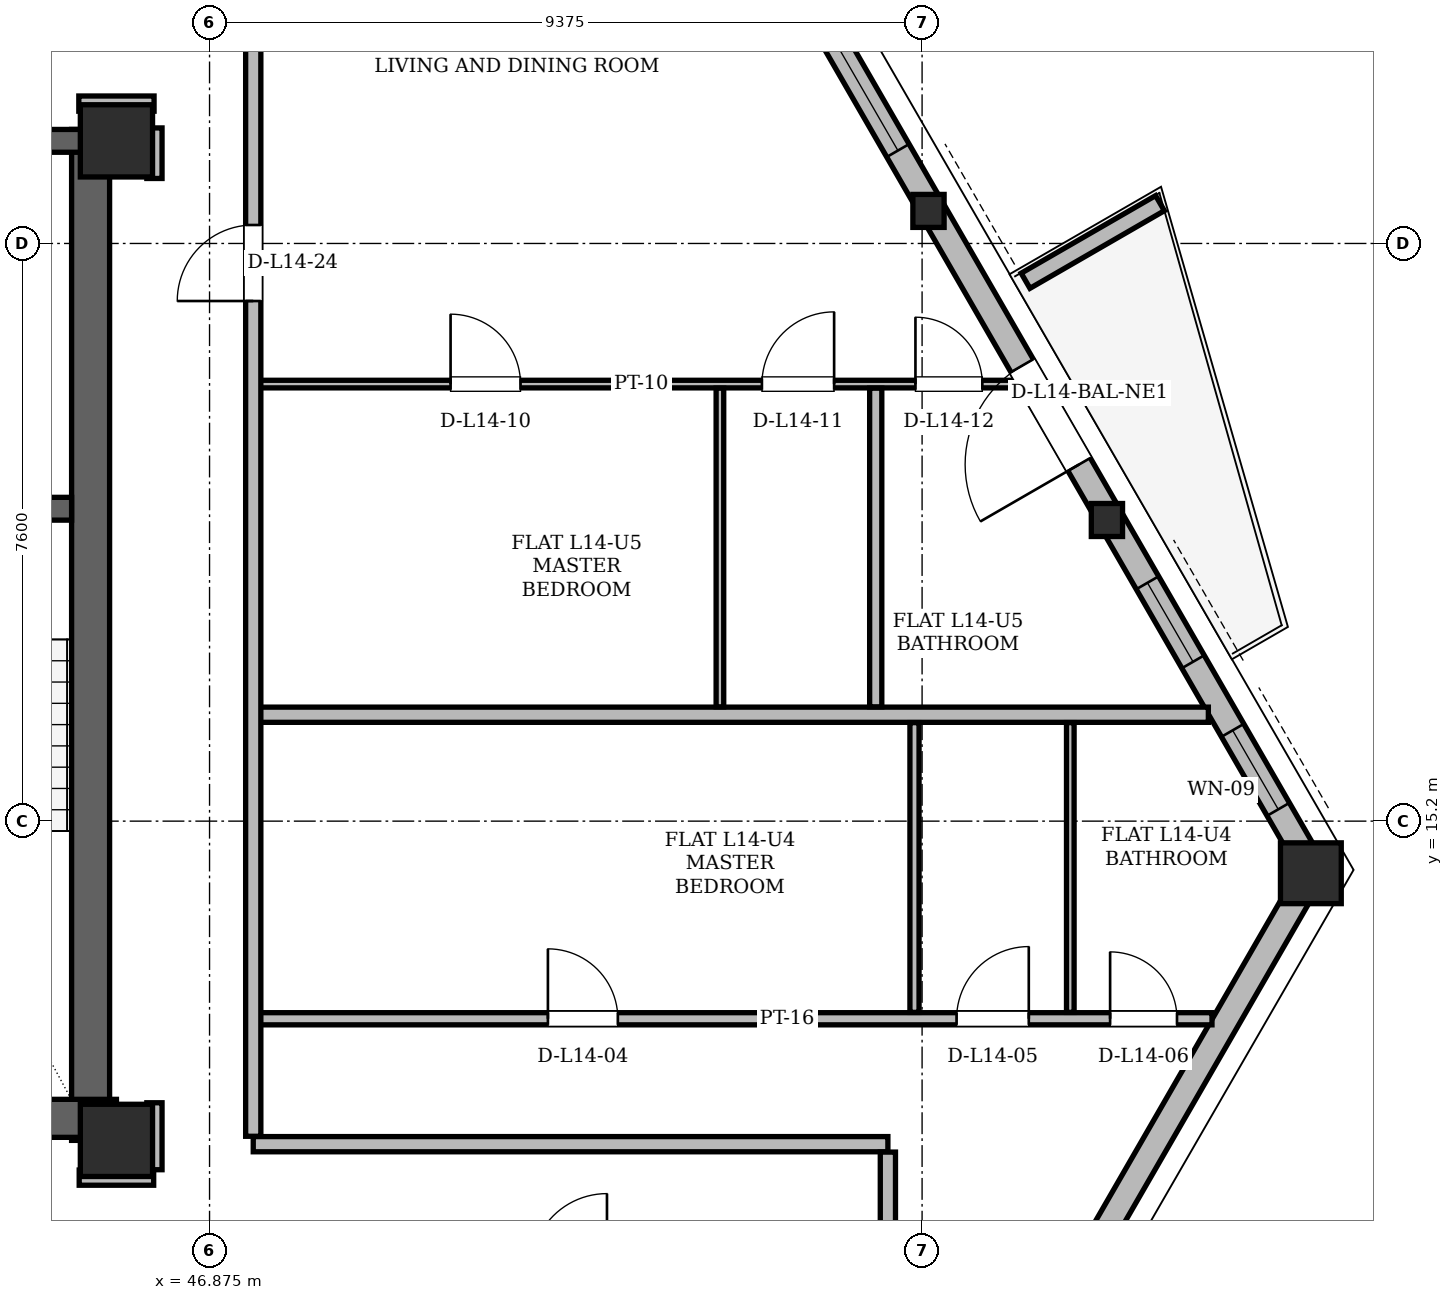
"""IFC4 building model, lengths in metres.
Left out: names, types, materials, properties, quantities, classifications, styles, units other than length and angle.
Written with IfcOpenShell. Run it as: python <this file> out.ifc"""

import sys

from ifc_helpers import new_model, si_unit, direction, frame, frame_2d, origin, origin_2d, place, context, subcontext, project, spatial, polyline, rectangle, hollow_rectangle, i_section, outline, extrude, element, fill, save


model = new_model("IFC4")
c1 = context("Model", 3, precision=1e-05, world=origin(), true_north=direction((0.0, 1.0)))
c2 = subcontext(c1, "Body", "Model", "MODEL_VIEW")
j1 = project(units=[si_unit("LENGTHUNIT", "METRE"), si_unit("PLANEANGLEUNIT", "RADIAN")], contexts=[c1])
p1 = place(None, origin())
s1 = spatial("IfcSite", under=j1, at=p1, CompositionType="ELEMENT")
p2 = place(p1, origin())
s2 = spatial("IfcBuilding", under=s1, at=p2, CompositionType="ELEMENT")
p3 = place(p2, frame((0.0, 0.0, 56.1)))
s3 = spatial("IfcBuildingStorey", under=s2, at=p3, CompositionType="ELEMENT", Elevation=56.1)
for number, where, z_axis, x_axis in (
    (1, (45.65, 11.0, 0.0), (0.0, 0.0, 1.0), (1.0, 0.0, 0.0)),
    (2, (45.65, 24.15, 0.0), (0.0, 0.0, 1.0), (1.0, 0.0, 0.0)),
):
    element("IfcColumn", number, at=place(p3, frame(where, z_axis=z_axis, x_axis=x_axis)), inside=s3, PredefinedType="COLUMN", context=c2, shape_type="SweptSolid", body=[
        extrude(hollow_rectangle(XDim=0.95, YDim=0.95, WallThickness=0.08, at=origin_2d()), origin(), (0.0, 0.0, 1.0), 3.6),
    ])
p4 = place(p3, frame((61.396, 14.559, 0.004), z_axis=(-0.017192634037, -0.024531782164, 0.999551201789), x_axis=(0.818912078135, -0.573918991047, 0.0)))
e3 = element("IfcColumn", 3, at=p4, inside=s3, PredefinedType="COLUMN", context=c2, shape_type="SweptSolid", body=[
    extrude(hollow_rectangle(XDim=0.8, YDim=0.8, WallThickness=0.065, at=origin_2d()), origin(), (0.0, 0.0, 1.0), 3.593),
])
for number, where, z_axis, x_axis in (
    (4, (58.716, 19.2, 0.004), (-0.019, -0.021, 1.0), (0.74, -0.673, 0.0)),
    (5, (56.372, 23.26, 0.004), (-0.021, -0.018, 1.0), (0.65, -0.76, 0.0)),
):
    element("IfcColumn", number, at=place(p3, frame(where, z_axis=z_axis, x_axis=x_axis)), inside=s3, PredefinedType="COLUMN", context=c2, shape_type="SweptSolid", body=[
        extrude(i_section(OverallWidth=0.411, OverallDepth=0.434, WebThickness=0.036, FlangeThickness=0.057, at=origin_2d()), origin(), (0.0, 0.0, 1.0), 3.593),
    ])
p5 = place(p3, frame((45.31, 11.0, 0.0), z_axis=(0.0, 0.0, 1.0), x_axis=(0.0, 1.0, 0.0)))
e6 = element("IfcWall", 6, at=p5, inside=s3, PredefinedType="SHEAR", context=c2, shape_type="SweptSolid", body=[
    extrude(rectangle(XDim=13.3, YDim=0.5, at=frame_2d((6.65, 0.0))), origin(), (0.0, 0.0, 1.0), 3.36),
])
p6 = place(p3, frame((38.55, 11.29, 0.0), z_axis=(0.0, 0.0, 1.0), x_axis=(1.0, 0.0, 0.0)))
e7 = element("IfcWall", 7, at=p6, inside=s3, PredefinedType="SHEAR", context=c2, shape_type="SweptSolid", body=[
    extrude(rectangle(XDim=7.1, YDim=0.5, at=frame_2d((3.55, 0.0))), origin(), (0.0, 0.0, 1.0), 3.36),
])
p7 = place(p3, frame((29.65, 24.15, 0.0), z_axis=(0.0, 0.0, 1.0), x_axis=(1.0, 0.0, 0.0)))
e8 = element("IfcWall", 8, at=p7, inside=s3, PredefinedType="SHEAR", context=c2, shape_type="SweptSolid", body=[
    extrude(rectangle(XDim=15.7, YDim=0.3, at=frame_2d((7.85, 0.0))), origin(), (0.0, 0.0, 1.0), 3.36),
])
p8 = place(p7, frame((1.7, 0.0, 0.0)))
e9 = element("IfcOpeningElement", 9, at=p8, cuts=e8, PredefinedType="OPENING", context=c2, shape_type="SweptSolid", body=[
    extrude(rectangle(XDim=1.2, YDim=2.2, at=frame_2d((0.6, 1.1))), frame((0.0, 0.15, 0.0), z_axis=(0.0, -1.0, 0.0), x_axis=(1.0, 0.0, 0.0)), (0.0, 0.0, 1.0), 0.3),
])
p9 = place(p7, frame((12.8, 0.0, 0.0)))
e10 = element("IfcOpeningElement", 10, at=p9, cuts=e8, PredefinedType="OPENING", context=c2, shape_type="SweptSolid", body=[
    extrude(rectangle(XDim=1.2, YDim=2.2, at=frame_2d((0.6, 1.1))), frame((0.0, 0.15, 0.0), z_axis=(0.0, -1.0, 0.0), x_axis=(1.0, 0.0, 0.0)), (0.0, 0.0, 1.0), 0.3),
])
p10 = place(p7, frame((6.55, 0.0, 0.0)))
e11 = element("IfcOpeningElement", 11, at=p10, cuts=e8, PredefinedType="OPENING", context=c2, shape_type="SweptSolid", body=[
    extrude(rectangle(XDim=0.9, YDim=2.05, at=frame_2d((0.45, 1.025))), frame((0.0, 0.15, 0.0), z_axis=(0.0, -1.0, 0.0), x_axis=(1.0, 0.0, 0.0)), (0.0, 0.0, 1.0), 0.3),
])
p11 = place(p7, frame((8.45, 0.0, 0.0)))
e12 = element("IfcOpeningElement", 12, at=p11, cuts=e8, PredefinedType="OPENING", context=c2, shape_type="SweptSolid", body=[
    extrude(rectangle(XDim=0.9, YDim=2.05, at=frame_2d((0.45, 1.025))), frame((0.0, 0.15, 0.0), z_axis=(0.0, -1.0, 0.0), x_axis=(1.0, 0.0, 0.0)), (0.0, 0.0, 1.0), 0.3),
])
p12 = place(p3, frame((41.05, 19.31, 0.0), z_axis=(0.0, 0.0, 1.0), x_axis=(1.0, 0.0, 0.0)))
e13 = element("IfcWall", 13, at=p12, inside=s3, PredefinedType="SHEAR", context=c2, shape_type="SweptSolid", body=[
    extrude(rectangle(XDim=4.01, YDim=0.3, at=frame_2d((2.005, 0.0))), origin(), (0.0, 0.0, 1.0), 3.36),
])
p13 = place(p12, frame((1.6, 0.0, 0.0)))
e14 = element("IfcOpeningElement", 14, at=p13, cuts=e13, PredefinedType="OPENING", context=c2, shape_type="SweptSolid", body=[
    extrude(rectangle(XDim=1.4, YDim=2.2, at=frame_2d((0.7, 1.1))), frame((0.0, 0.15, 0.0), z_axis=(0.0, -1.0, 0.0), x_axis=(1.0, 0.0, 0.0)), (0.0, 0.0, 1.0), 0.3),
])
p14 = place(p3, frame((54.247, 2.176, 0.0), z_axis=(0.0, 0.0, 1.0), x_axis=(0.500012153807, 0.866018386667, 0.0)))
e15 = element("IfcWall", 15, at=p14, inside=s3, PredefinedType="SOLIDWALL", context=c2, shape_type="SweptSolid", body=[
    extrude(rectangle(XDim=14.298, YDim=0.34, at=frame_2d((7.149, 0.0))), origin(), (0.0, 0.0, 1.0), 2.494),
])
p15 = place(p3, frame((61.396, 14.559, 0.0), z_axis=(0.0, 0.0, 1.0), x_axis=(-0.500002389912, 0.866024023964, 0.0)))
e16 = element("IfcWall", 16, at=p15, inside=s3, PredefinedType="SOLIDWALL", context=c2, shape_type="SweptSolid", body=[
    extrude(rectangle(XDim=33.494, YDim=0.34, at=frame_2d((16.747, 0.0))), origin(), (0.0, 0.0, 1.0), 2.494),
])
p16 = place(p15, frame((6.159, 0.0, 0.0)))
e17 = element("IfcOpeningElement", 17, at=p16, cuts=e16, PredefinedType="OPENING", context=c2, shape_type="SweptSolid", body=[
    extrude(rectangle(XDim=1.5, YDim=2.2, at=frame_2d((0.75, 1.1))), frame((0.0, 0.17, 0.0), z_axis=(0.0, -1.0, 0.0), x_axis=(1.0, 0.0, 0.0)), (0.0, 0.0, 1.0), 0.34),
])
p17 = place(p15, frame((24.379, 0.0, 0.0)))
e18 = element("IfcOpeningElement", 18, at=p17, cuts=e16, PredefinedType="OPENING", context=c2, shape_type="SweptSolid", body=[
    extrude(rectangle(XDim=1.5, YDim=2.2, at=frame_2d((0.75, 1.1))), frame((0.0, 0.17, 0.0), z_axis=(0.0, -1.0, 0.0), x_axis=(1.0, 0.0, 0.0)), (0.0, 0.0, 1.0), 0.34),
])
p18 = place(p15, frame((0.92, 0.0, 0.85)))
e19 = element("IfcOpeningElement", 19, at=p18, cuts=e16, PredefinedType="OPENING", context=c2, shape_type="SweptSolid", body=[
    extrude(rectangle(XDim=1.2, YDim=1.48, at=frame_2d((0.6, 0.74))), frame((0.0, 0.17, 0.0), z_axis=(0.0, -1.0, 0.0), x_axis=(1.0, 0.0, 0.0)), (0.0, 0.0, 1.0), 0.34),
])
p19 = place(p15, frame((10.928, 0.0, 0.85)))
e20 = element("IfcOpeningElement", 20, at=p19, cuts=e16, PredefinedType="OPENING", context=c2, shape_type="SweptSolid", body=[
    extrude(rectangle(XDim=1.6, YDim=1.534, at=frame_2d((0.8, 0.767))), frame((0.0, 0.17, 0.0), z_axis=(0.0, -1.0, 0.0), x_axis=(1.0, 0.0, 0.0)), (0.0, 0.0, 1.0), 0.34),
])
p20 = place(p15, frame((18.529, 0.0, 0.85)))
e21 = element("IfcOpeningElement", 21, at=p20, cuts=e16, PredefinedType="OPENING", context=c2, shape_type="SweptSolid", body=[
    extrude(rectangle(XDim=3.0, YDim=1.534, at=frame_2d((1.5, 0.767))), frame((0.0, 0.17, 0.0), z_axis=(0.0, -1.0, 0.0), x_axis=(1.0, 0.0, 0.0)), (0.0, 0.0, 1.0), 0.34),
])
p21 = place(p15, frame((3.162, 0.0, 0.85)))
e22 = element("IfcOpeningElement", 22, at=p21, cuts=e16, PredefinedType="OPENING", context=c2, shape_type="SweptSolid", body=[
    extrude(rectangle(XDim=1.2, YDim=1.48, at=frame_2d((0.6, 0.74))), frame((0.0, 0.17, 0.0), z_axis=(0.0, -1.0, 0.0), x_axis=(1.0, 0.0, 0.0)), (0.0, 0.0, 1.0), 0.34),
])
p22 = place(p3, frame((57.612, 22.309, 0.0), z_axis=(0.0, 0.0, 1.0), x_axis=(0.866012356593, 0.500022597718, 0.0)))
e23 = element("IfcWall", 23, at=p22, inside=s3, PredefinedType="PARAPET", context=c2, shape_type="SweptSolid", body=[
    extrude(outline(polyline([(0.0, 0.0), (2.042, 0.0), (2.042, 1.1), (0.0, 1.32), (0.0, 0.0)])), frame((0.0, 0.115, 0.0), z_axis=(0.0, -1.0, 0.0), x_axis=(1.0, 0.0, 0.0)), (0.0, 0.0, 1.0), 0.23),
])
p23 = place(p3, frame((45.16, 10.51, 0.0), z_axis=(0.0, 0.0, 1.0), x_axis=(1.0, 0.0, 0.0)))
e24 = element("IfcWall", 24, at=p23, inside=s3, PredefinedType="PARTITIONING", context=c2, shape_type="SweptSolid", body=[
    extrude(rectangle(XDim=0.98, YDim=0.2, at=frame_2d((0.49, 0.0))), origin(), (0.0, 0.0, 1.0), 2.738),
])
p24 = place(p3, frame((47.45, 10.95, 0.0), z_axis=(0.0, 0.0, 1.0), x_axis=(1.0, 0.0, 0.0)))
e25 = element("IfcWall", 25, at=p24, inside=s3, PredefinedType="PARTITIONING", context=c2, shape_type="SweptSolid", body=[
    extrude(rectangle(XDim=8.35, YDim=0.2, at=frame_2d((4.175, 0.0))), origin(), (0.0, 0.0, 1.0), 3.36),
])
p25 = place(p3, frame((47.4, 12.6, 0.0), z_axis=(0.0, 0.0, 1.0), x_axis=(1.0, 0.0, 0.0)))
e26 = element("IfcWall", 26, at=p25, inside=s3, PredefinedType="PARTITIONING", context=c2, shape_type="SweptSolid", body=[
    extrude(rectangle(XDim=12.664, YDim=0.16, at=frame_2d((6.332, 0.0))), origin(), (0.0, 0.0, 1.0), 2.738),
])
p26 = place(p25, frame((3.927, 0.0, 0.0)))
e27 = element("IfcOpeningElement", 27, at=p26, cuts=e26, PredefinedType="OPENING", context=c2, shape_type="SweptSolid", body=[
    extrude(rectangle(XDim=0.92, YDim=2.12, at=frame_2d((0.46, 1.06))), frame((0.0, 0.08, 0.0), z_axis=(0.0, -1.0, 0.0), x_axis=(1.0, 0.0, 0.0)), (0.0, 0.0, 1.0), 0.16),
])
p27 = place(p25, frame((9.304, 0.0, 0.0)))
e28 = element("IfcOpeningElement", 28, at=p27, cuts=e26, PredefinedType="OPENING", context=c2, shape_type="SweptSolid", body=[
    extrude(rectangle(XDim=0.95, YDim=2.1, at=frame_2d((0.475, 1.05))), frame((0.0, 0.08, 0.0), z_axis=(0.0, -1.0, 0.0), x_axis=(1.0, 0.0, 0.0)), (0.0, 0.0, 1.0), 0.16),
])
p28 = place(p25, frame((11.324, 0.0, 0.0)))
e29 = element("IfcOpeningElement", 29, at=p28, cuts=e26, PredefinedType="OPENING", context=c2, shape_type="SweptSolid", body=[
    extrude(rectangle(XDim=0.88, YDim=2.08, at=frame_2d((0.44, 1.04))), frame((0.0, 0.08, 0.0), z_axis=(0.0, -1.0, 0.0), x_axis=(1.0, 0.0, 0.0)), (0.0, 0.0, 1.0), 0.16),
])
p29 = place(p3, frame((47.45, 16.6, 0.0), z_axis=(0.0, 0.0, 1.0), x_axis=(1.0, 0.0, 0.0)))
e30 = element("IfcWall", 30, at=p29, inside=s3, PredefinedType="PARTITIONING", context=c2, shape_type="SweptSolid", body=[
    extrude(rectangle(XDim=12.566, YDim=0.2, at=frame_2d((6.283, 0.0))), origin(), (0.0, 0.0, 1.0), 2.494),
])
p30 = place(p3, frame((47.4, 20.95, 0.0), z_axis=(0.0, 0.0, 1.0), x_axis=(1.0, 0.0, 0.0)))
e31 = element("IfcWall", 31, at=p30, inside=s3, PredefinedType="PARTITIONING", context=c2, shape_type="SweptSolid", body=[
    extrude(rectangle(XDim=10.105, YDim=0.1, at=frame_2d((5.052, 0.0))), origin(), (0.0, 0.0, 1.0), 3.36),
])
p31 = place(p30, frame((2.646, 0.0, 0.0)))
e32 = element("IfcOpeningElement", 32, at=p31, cuts=e31, PredefinedType="OPENING", context=c2, shape_type="SweptSolid", body=[
    extrude(rectangle(XDim=0.92, YDim=2.12, at=frame_2d((0.46, 1.06))), frame((0.0, 0.05, 0.0), z_axis=(0.0, -1.0, 0.0), x_axis=(1.0, 0.0, 0.0)), (0.0, 0.0, 1.0), 0.1),
])
p32 = place(p30, frame((6.743, 0.0, 0.0)))
e33 = element("IfcOpeningElement", 33, at=p32, cuts=e31, PredefinedType="OPENING", context=c2, shape_type="SweptSolid", body=[
    extrude(rectangle(XDim=0.95, YDim=2.1, at=frame_2d((0.475, 1.05))), frame((0.0, 0.05, 0.0), z_axis=(0.0, -1.0, 0.0), x_axis=(1.0, 0.0, 0.0)), (0.0, 0.0, 1.0), 0.1),
])
p33 = place(p30, frame((8.763, 0.0, 0.0)))
e34 = element("IfcOpeningElement", 34, at=p33, cuts=e31, PredefinedType="OPENING", context=c2, shape_type="SweptSolid", body=[
    extrude(rectangle(XDim=0.88, YDim=2.08, at=frame_2d((0.44, 1.04))), frame((0.0, 0.05, 0.0), z_axis=(0.0, -1.0, 0.0), x_axis=(1.0, 0.0, 0.0)), (0.0, 0.0, 1.0), 0.1),
])
p34 = place(p3, frame((45.155, 24.64, 0.0), z_axis=(0.0, 0.0, 1.0), x_axis=(1.0, 0.0, 0.0)))
e35 = element("IfcWall", 35, at=p34, inside=s3, PredefinedType="PARTITIONING", context=c2, shape_type="SweptSolid", body=[
    extrude(rectangle(XDim=0.99, YDim=0.2, at=frame_2d((0.495, 0.0))), origin(), (0.0, 0.0, 1.0), 2.738),
])
p35 = place(p3, frame((46.15, 10.614, 0.0), z_axis=(0.0, 0.0, 1.0), x_axis=(0.0, 1.0, 0.0)))
e36 = element("IfcWall", 36, at=p35, inside=s3, PredefinedType="PARTITIONING", context=c2, shape_type="SweptSolid", body=[
    extrude(rectangle(XDim=0.881, YDim=0.2, at=frame_2d((0.44, 0.0))), origin(), (0.0, 0.0, 1.0), 2.738),
])
p36 = place(p3, frame((46.15, 23.655, 0.0), z_axis=(0.0, 0.0, 1.0), x_axis=(0.0, 1.0, 0.0)))
e37 = element("IfcWall", 37, at=p36, inside=s3, PredefinedType="PARTITIONING", context=c2, shape_type="SweptSolid", body=[
    extrude(rectangle(XDim=0.665, YDim=0.2, at=frame_2d((0.333, 0.0))), origin(), (0.0, 0.0, 1.0), 2.946),
])
p37 = place(p3, frame((47.45, 11.054, 0.0), z_axis=(0.0, 0.0, 1.0), x_axis=(0.0, 1.0, 0.0)))
e38 = element("IfcWall", 38, at=p37, inside=s3, PredefinedType="PARTITIONING", context=c2, shape_type="SweptSolid", body=[
    extrude(rectangle(XDim=27.312, YDim=0.2, at=frame_2d((13.656, 0.0))), origin(), (0.0, 0.0, 1.0), 2.494),
])
p38 = place(p37, frame((10.989, 0.0, 0.0)))
e39 = element("IfcOpeningElement", 39, at=p38, cuts=e38, PredefinedType="OPENING", context=c2, shape_type="SweptSolid", body=[
    extrude(rectangle(XDim=1.0, YDim=2.18, at=frame_2d((0.5, 1.09))), frame((0.0, 0.1, 0.0), z_axis=(0.0, -1.0, 0.0), x_axis=(1.0, 0.0, 0.0)), (0.0, 0.0, 1.0), 0.2),
])
p39 = place(p3, frame((53.59, 16.704, 0.0), z_axis=(0.0, 0.0, 1.0), x_axis=(0.0, 1.0, 0.0)))
e40 = element("IfcWall", 40, at=p39, inside=s3, PredefinedType="PARTITIONING", context=c2, shape_type="SweptSolid", body=[
    extrude(rectangle(XDim=4.192, YDim=0.1, at=frame_2d((2.096, 0.0))), origin(), (0.0, 0.0, 1.0), 3.36),
])
p40 = place(p3, frame((55.64, 16.704, 0.0), z_axis=(0.0, 0.0, 1.0), x_axis=(0.0, 1.0, 0.0)))
e41 = element("IfcWall", 41, at=p40, inside=s3, PredefinedType="PARTITIONING", context=c2, shape_type="SweptSolid", body=[
    extrude(rectangle(XDim=4.192, YDim=0.16, at=frame_2d((2.096, 0.0))), origin(), (0.0, 0.0, 1.0), 2.946),
])
p41 = place(p3, frame((55.8, 9.404, 0.0), z_axis=(0.0, 0.0, 1.0), x_axis=(0.0, 1.0, 0.0)))
e42 = element("IfcWall", 42, at=p41, inside=s3, PredefinedType="PARTITIONING", context=c2, shape_type="SweptSolid", body=[
    extrude(rectangle(XDim=1.442, YDim=0.2, at=frame_2d((0.721, 0.0))), origin(), (0.0, 0.0, 1.0), 3.36),
])
p42 = place(p3, frame((56.15, 12.684, 0.0), z_axis=(0.0, 0.0, 1.0), x_axis=(0.0, 1.0, 0.0)))
e43 = element("IfcWall", 43, at=p42, inside=s3, PredefinedType="PARTITIONING", context=c2, shape_type="SweptSolid", body=[
    extrude(rectangle(XDim=3.812, YDim=0.12, at=frame_2d((1.906, 0.0))), origin(), (0.0, 0.0, 1.0), 2.738),
])
p43 = place(p3, frame((58.2, 12.684, 0.0), z_axis=(0.0, 0.0, 1.0), x_axis=(0.0, 1.0, 0.0)))
e44 = element("IfcWall", 44, at=p43, inside=s3, PredefinedType="PARTITIONING", context=c2, shape_type="SweptSolid", body=[
    extrude(rectangle(XDim=3.812, YDim=0.1, at=frame_2d((1.906, 0.0))), origin(), (0.0, 0.0, 1.0), 2.738),
])
p44 = place(p16, origin())
e45 = element("IfcDoor", 45, at=p44, inside=s3, OperationType="SINGLE_SWING_LEFT", PredefinedType="DOOR", context=c2, shape_type="SweptSolid", body=[
    extrude(rectangle(XDim=1.5, YDim=2.2, at=frame_2d((0.75, 1.1))), frame((0.0, 0.025, 0.0), z_axis=(0.0, -1.0, 0.0), x_axis=(1.0, 0.0, 0.0)), (0.0, 0.0, 1.0), 0.05),
])
fill(e17, e45)
p45 = place(p18, origin())
e46 = element("IfcWindow", 46, at=p45, inside=s3, PartitioningType="SINGLE_PANEL", PredefinedType="WINDOW", context=c2, shape_type="SweptSolid", body=[
    extrude(rectangle(XDim=1.2, YDim=1.48, at=frame_2d((0.6, 0.74))), frame((0.0, 0.03, 0.0), z_axis=(0.0, -1.0, 0.0), x_axis=(1.0, 0.0, 0.0)), (0.0, 0.0, 1.0), 0.06),
])
fill(e19, e46)
p46 = place(p19, origin())
e47 = element("IfcWindow", 47, at=p46, inside=s3, PartitioningType="SINGLE_PANEL", PredefinedType="WINDOW", context=c2, shape_type="SweptSolid", body=[
    extrude(rectangle(XDim=1.6, YDim=1.534, at=frame_2d((0.8, 0.767))), frame((0.0, 0.03, 0.0), z_axis=(0.0, -1.0, 0.0), x_axis=(1.0, 0.0, 0.0)), (0.0, 0.0, 1.0), 0.06),
])
fill(e20, e47)
p47 = place(p21, origin())
e48 = element("IfcWindow", 48, at=p47, inside=s3, PartitioningType="SINGLE_PANEL", PredefinedType="WINDOW", context=c2, shape_type="SweptSolid", body=[
    extrude(rectangle(XDim=1.2, YDim=1.48, at=frame_2d((0.6, 0.74))), frame((0.0, 0.03, 0.0), z_axis=(0.0, -1.0, 0.0), x_axis=(1.0, 0.0, 0.0)), (0.0, 0.0, 1.0), 0.06),
])
fill(e22, e48)
p48 = place(p26, origin())
e49 = element("IfcDoor", 49, at=p48, inside=s3, OperationType="SINGLE_SWING_LEFT", PredefinedType="DOOR", context=c2, shape_type="SweptSolid", body=[
    extrude(rectangle(XDim=0.92, YDim=2.12, at=frame_2d((0.46, 1.06))), frame((0.0, 0.025, 0.0), z_axis=(0.0, -1.0, 0.0), x_axis=(1.0, 0.0, 0.0)), (0.0, 0.0, 1.0), 0.05),
])
fill(e27, e49)
p49 = place(p27, origin())
e50 = element("IfcDoor", 50, at=p49, inside=s3, OperationType="SINGLE_SWING_RIGHT", PredefinedType="DOOR", context=c2, shape_type="SweptSolid", body=[
    extrude(rectangle(XDim=0.95, YDim=2.1, at=frame_2d((0.475, 1.05))), frame((0.0, 0.025, 0.0), z_axis=(0.0, -1.0, 0.0), x_axis=(1.0, 0.0, 0.0)), (0.0, 0.0, 1.0), 0.05),
])
fill(e28, e50)
p50 = place(p28, origin())
e51 = element("IfcDoor", 51, at=p50, inside=s3, OperationType="SINGLE_SWING_LEFT", PredefinedType="DOOR", context=c2, shape_type="SweptSolid", body=[
    extrude(rectangle(XDim=0.88, YDim=2.08, at=frame_2d((0.44, 1.04))), frame((0.0, 0.025, 0.0), z_axis=(0.0, -1.0, 0.0), x_axis=(1.0, 0.0, 0.0)), (0.0, 0.0, 1.0), 0.05),
])
fill(e29, e51)
p51 = place(p31, origin())
e52 = element("IfcDoor", 52, at=p51, inside=s3, OperationType="SINGLE_SWING_LEFT", PredefinedType="DOOR", context=c2, shape_type="SweptSolid", body=[
    extrude(rectangle(XDim=0.92, YDim=2.12, at=frame_2d((0.46, 1.06))), frame((0.0, 0.025, 0.0), z_axis=(0.0, -1.0, 0.0), x_axis=(1.0, 0.0, 0.0)), (0.0, 0.0, 1.0), 0.05),
])
fill(e32, e52)
p52 = place(p32, origin())
e53 = element("IfcDoor", 53, at=p52, inside=s3, OperationType="SINGLE_SWING_RIGHT", PredefinedType="DOOR", context=c2, shape_type="SweptSolid", body=[
    extrude(rectangle(XDim=0.95, YDim=2.1, at=frame_2d((0.475, 1.05))), frame((0.0, 0.025, 0.0), z_axis=(0.0, -1.0, 0.0), x_axis=(1.0, 0.0, 0.0)), (0.0, 0.0, 1.0), 0.05),
])
fill(e33, e53)
p53 = place(p33, origin())
e54 = element("IfcDoor", 54, at=p53, inside=s3, OperationType="SINGLE_SWING_LEFT", PredefinedType="DOOR", context=c2, shape_type="SweptSolid", body=[
    extrude(rectangle(XDim=0.88, YDim=2.08, at=frame_2d((0.44, 1.04))), frame((0.0, 0.025, 0.0), z_axis=(0.0, -1.0, 0.0), x_axis=(1.0, 0.0, 0.0)), (0.0, 0.0, 1.0), 0.05),
])
fill(e34, e54)
p54 = place(p38, origin())
e55 = element("IfcDoor", 55, at=p54, inside=s3, OperationType="SINGLE_SWING_LEFT", PredefinedType="DOOR", context=c2, shape_type="SweptSolid", body=[
    extrude(rectangle(XDim=1.0, YDim=2.18, at=frame_2d((0.5, 1.09))), frame((0.0, 0.025, 0.0), z_axis=(0.0, -1.0, 0.0), x_axis=(1.0, 0.0, 0.0)), (0.0, 0.0, 1.0), 0.05),
])
fill(e39, e55)
save(model, sys.argv[1])
